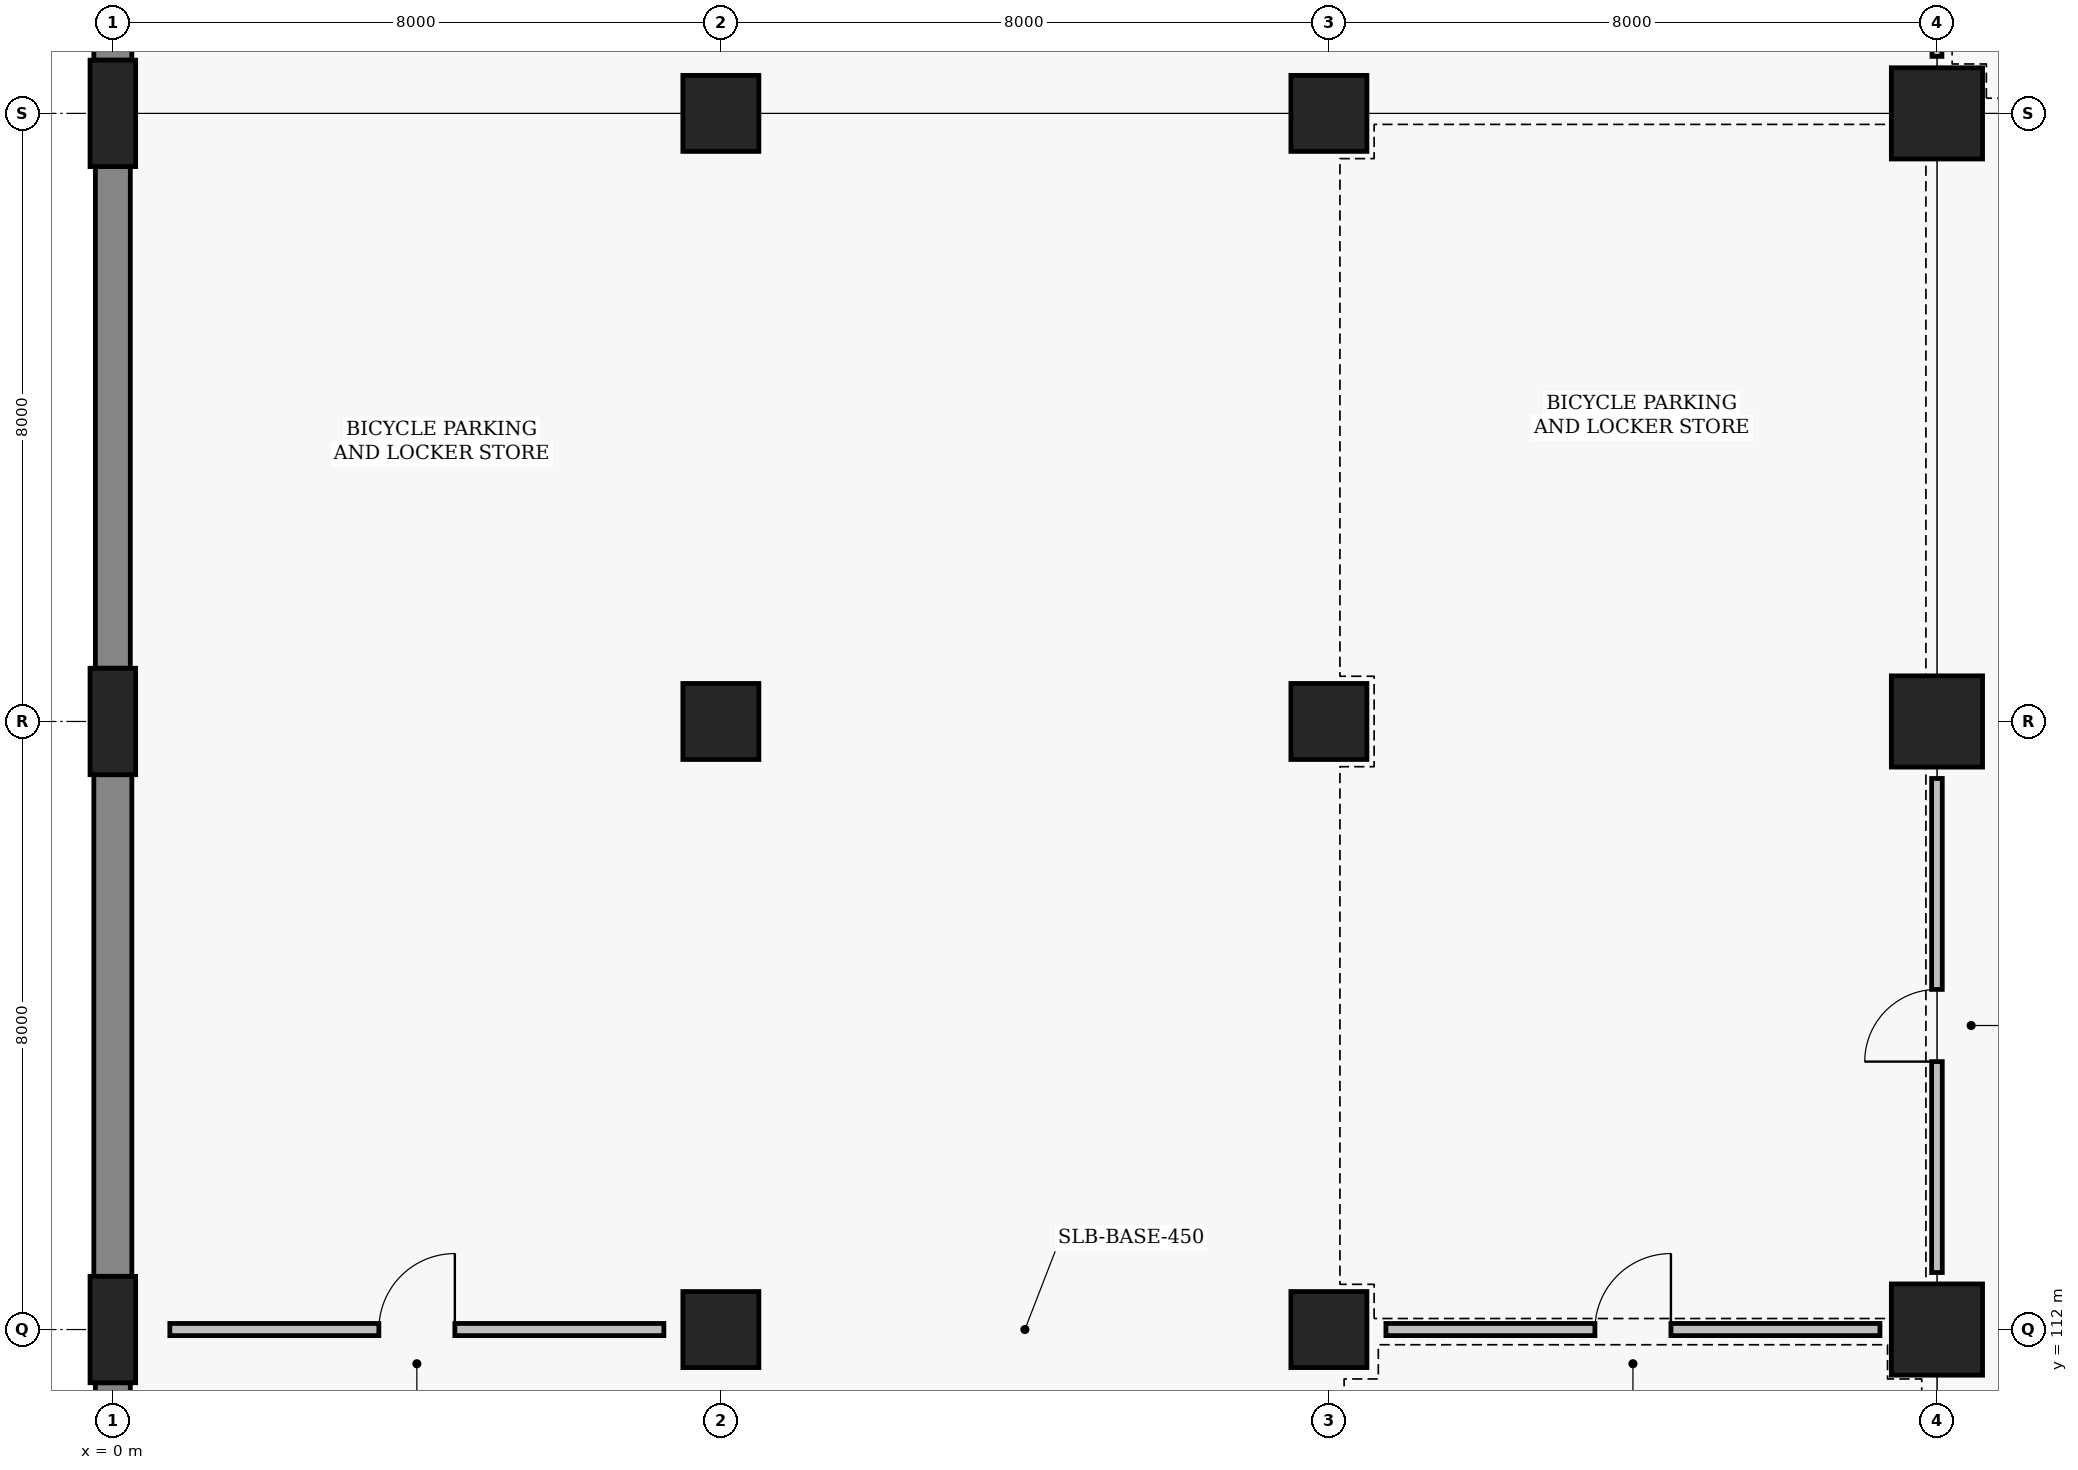
"""IFC4 building model, lengths in metres.
Left out: names, types, materials, properties, quantities, classifications, styles, units other than length and angle.
Written with IfcOpenShell. Run it as: python <this file> out.ifc"""

import sys

from ifc_helpers import new_model, si_unit, direction, frame, frame_2d, origin, origin_2d, place, context, subcontext, project, spatial, rectangle, circle, extrude, element, fill, save


model = new_model("IFC4")
c1 = context("Model", 3, precision=1e-05, world=origin(), true_north=direction((0.0, 1.0)))
c2 = subcontext(c1, "Body", "Model", "MODEL_VIEW")
j1 = project(units=[si_unit("LENGTHUNIT", "METRE"), si_unit("PLANEANGLEUNIT", "RADIAN")], contexts=[c1])
p1 = place(None, origin())
s1 = spatial("IfcSite", under=j1, at=p1, CompositionType="ELEMENT")
p2 = place(p1, origin())
s2 = spatial("IfcBuilding", under=s1, at=p2, CompositionType="ELEMENT")
p3 = place(p2, frame((0.0, 0.0, -5.4)))
s3 = spatial("IfcBuildingStorey", under=s2, at=p3, CompositionType="ELEMENT", Elevation=-5.4)
for number, where, z_axis, x_axis in (
    (1, (0.0, 112.0, 0.0), (0.0, 0.0, 1.0), (1.0, 0.0, 0.0)),
    (2, (0.0, 120.0, 0.0), (0.0, 0.0, 1.0), (1.0, 0.0, 0.0)),
    (3, (0.0, 128.0, 0.0), (0.0, 0.0, 1.0), (1.0, 0.0, 0.0)),
):
    element("IfcColumn", number, at=place(p3, frame(where, z_axis=z_axis, x_axis=x_axis)), inside=s3, PredefinedType="PILASTER", context=c2, shape_type="SweptSolid", body=[
        extrude(rectangle(XDim=0.6, YDim=1.4, at=origin_2d()), origin(), (0.0, 0.0, 1.0), 5.4),
    ])
for number, where, z_axis, x_axis in (
    (4, (8.0, 112.0, 0.0), (0.0, 0.0, 1.0), (1.0, 0.0, 0.0)),
    (5, (8.0, 120.0, 0.0), (0.0, 0.0, 1.0), (1.0, 0.0, 0.0)),
    (6, (8.0, 128.0, 0.0), (0.0, 0.0, 1.0), (1.0, 0.0, 0.0)),
    (7, (16.0, 112.0, 0.0), (0.0, 0.0, 1.0), (1.0, 0.0, 0.0)),
    (8, (16.0, 120.0, 0.0), (0.0, 0.0, 1.0), (1.0, 0.0, 0.0)),
    (9, (16.0, 128.0, 0.0), (0.0, 0.0, 1.0), (1.0, 0.0, 0.0)),
):
    element("IfcColumn", number, at=place(p3, frame(where, z_axis=z_axis, x_axis=x_axis)), inside=s3, PredefinedType="COLUMN", context=c2, shape_type="SweptSolid", body=[
        extrude(circle(Radius=0.5, at=origin_2d()), origin(), (0.0, 0.0, 1.0), 5.4),
    ])
for number, where, z_axis, x_axis in (
    (10, (24.0, 112.0, 0.0), (0.0, 0.0, 1.0), (1.0, 0.0, 0.0)),
    (11, (24.0, 120.0, 0.0), (0.0, 0.0, 1.0), (1.0, 0.0, 0.0)),
    (12, (24.0, 128.0, 0.0), (0.0, 0.0, 1.0), (1.0, 0.0, 0.0)),
):
    element("IfcColumn", number, at=place(p3, frame(where, z_axis=z_axis, x_axis=x_axis)), inside=s3, PredefinedType="COLUMN", context=c2, shape_type="SweptSolid", body=[
        extrude(rectangle(XDim=1.2, YDim=1.2, at=origin_2d()), origin(), (0.0, 0.0, 1.0), 5.4),
    ])
p4 = place(p3, frame((0.0, 104.7, 0.0), z_axis=(0.0, 0.0, 1.0), x_axis=(0.0, 1.0, 0.0)))
e13 = element("IfcWall", 13, at=p4, inside=s3, PredefinedType="STANDARD", context=c2, shape_type="SweptSolid", body=[
    extrude(rectangle(XDim=6.6, YDim=0.46, at=frame_2d((3.3, 0.0))), origin(), (0.0, 0.0, 1.0), 3.69),
])
p5 = place(p3, frame((0.0, 112.7, 0.0), z_axis=(0.0, 0.0, 1.0), x_axis=(0.0, 1.0, 0.0)))
e14 = element("IfcWall", 14, at=p5, inside=s3, PredefinedType="STANDARD", context=c2, shape_type="SweptSolid", body=[
    extrude(rectangle(XDim=6.6, YDim=0.5, at=frame_2d((3.3, 0.0))), origin(), (0.0, 0.0, 1.0), 3.69),
])
p6 = place(p3, frame((0.0, 120.7, 0.0), z_axis=(0.0, 0.0, 1.0), x_axis=(0.0, 1.0, 0.0)))
e15 = element("IfcWall", 15, at=p6, inside=s3, PredefinedType="STANDARD", context=c2, shape_type="SweptSolid", body=[
    extrude(rectangle(XDim=6.6, YDim=0.46, at=frame_2d((3.3, 0.0))), origin(), (0.0, 0.0, 1.0), 4.24),
])
p7 = place(p3, frame((0.0, 128.7, 0.0), z_axis=(0.0, 0.0, 1.0), x_axis=(0.0, 1.0, 0.0)))
e16 = element("IfcWall", 16, at=p7, inside=s3, PredefinedType="STANDARD", context=c2, shape_type="SweptSolid", body=[
    extrude(rectangle(XDim=6.6, YDim=0.5, at=frame_2d((3.3, 0.0))), origin(), (0.0, 0.0, 1.0), 4.24),
])
p8 = place(p3, frame((24.0, 112.75, 0.0), z_axis=(0.0, 0.0, 1.0), x_axis=(0.0, 1.0, 0.0)))
e17 = element("IfcWall", 17, at=p8, inside=s3, PredefinedType="MOVABLE", context=c2, shape_type="SweptSolid", body=[
    extrude(rectangle(XDim=6.5, YDim=0.14, at=frame_2d((3.25, 0.0))), origin(), (0.0, 0.0, 1.0), 4.39),
])
p9 = place(p8, frame((2.775, 0.0, 0.0)))
e18 = element("IfcOpeningElement", 18, at=p9, cuts=e17, PredefinedType="OPENING", context=c2, shape_type="SweptSolid", body=[
    extrude(rectangle(XDim=0.95, YDim=2.1, at=frame_2d((0.475, 1.05))), frame((0.0, 0.08, 0.0), z_axis=(0.0, -1.0, 0.0), x_axis=(1.0, 0.0, 0.0)), (0.0, 0.0, 1.0), 0.16),
])
p10 = place(p3, frame((24.0, 128.75, 0.0), z_axis=(0.0, 0.0, 1.0), x_axis=(0.0, 1.0, 0.0)))
e19 = element("IfcWall", 19, at=p10, inside=s3, PredefinedType="PARTITIONING", context=c2, shape_type="SweptSolid", body=[
    extrude(rectangle(XDim=6.5, YDim=0.13, at=frame_2d((3.25, 0.0))), origin(), (0.0, 0.0, 1.0), 4.39),
])
p11 = place(p10, frame((2.75, 0.0, 0.0)))
e20 = element("IfcOpeningElement", 20, at=p11, cuts=e19, PredefinedType="OPENING", context=c2, shape_type="SweptSolid", body=[
    extrude(rectangle(XDim=1.0, YDim=2.1, at=frame_2d((0.5, 1.05))), frame((0.0, 0.075, 0.0), z_axis=(0.0, -1.0, 0.0), x_axis=(1.0, 0.0, 0.0)), (0.0, 0.0, 1.0), 0.15),
])
p12 = place(p3, frame((0.75, 112.0, 0.0), z_axis=(0.0, 0.0, 1.0), x_axis=(1.0, 0.0, 0.0)))
e21 = element("IfcWall", 21, at=p12, inside=s3, PredefinedType="PARTITIONING", context=c2, shape_type="SweptSolid", body=[
    extrude(rectangle(XDim=6.5, YDim=0.16, at=frame_2d((3.25, 0.0))), origin(), (0.0, 0.0, 1.0), 3.69),
])
p13 = place(p12, frame((2.75, 0.0, 0.0)))
e22 = element("IfcOpeningElement", 22, at=p13, cuts=e21, PredefinedType="OPENING", context=c2, shape_type="SweptSolid", body=[
    extrude(rectangle(XDim=1.0, YDim=2.1, at=frame_2d((0.5, 1.05))), frame((0.0, 0.09, 0.0), z_axis=(0.0, -1.0, 0.0), x_axis=(1.0, 0.0, 0.0)), (0.0, 0.0, 1.0), 0.18),
])
p14 = place(p3, frame((16.75, 112.0, 0.0), z_axis=(0.0, 0.0, 1.0), x_axis=(1.0, 0.0, 0.0)))
e23 = element("IfcWall", 23, at=p14, inside=s3, PredefinedType="PARTITIONING", context=c2, shape_type="SweptSolid", body=[
    extrude(rectangle(XDim=6.5, YDim=0.16, at=frame_2d((3.25, 0.0))), origin(), (0.0, 0.0, 1.0), 4.49),
])
p15 = place(p14, frame((2.75, 0.0, 0.0)))
e24 = element("IfcOpeningElement", 24, at=p15, cuts=e23, PredefinedType="OPENING", context=c2, shape_type="SweptSolid", body=[
    extrude(rectangle(XDim=1.0, YDim=2.1, at=frame_2d((0.5, 1.05))), frame((0.0, 0.09, 0.0), z_axis=(0.0, -1.0, 0.0), x_axis=(1.0, 0.0, 0.0)), (0.0, 0.0, 1.0), 0.18),
])
p16 = place(p9, origin())
e25 = element("IfcDoor", 25, at=p16, inside=s3, OperationType="SINGLE_SWING_LEFT", PredefinedType="DOOR", context=c2, shape_type="SweptSolid", body=[
    extrude(rectangle(XDim=0.95, YDim=2.1, at=frame_2d((0.475, 1.05))), frame((0.0, 0.025, 0.0), z_axis=(0.0, -1.0, 0.0), x_axis=(1.0, 0.0, 0.0)), (0.0, 0.0, 1.0), 0.05),
])
fill(e18, e25)
p17 = place(p13, origin())
e26 = element("IfcDoor", 26, at=p17, inside=s3, OperationType="SINGLE_SWING_RIGHT", PredefinedType="DOOR", context=c2, shape_type="SweptSolid", body=[
    extrude(rectangle(XDim=1.0, YDim=2.1, at=frame_2d((0.5, 1.05))), frame((0.0, 0.025, 0.0), z_axis=(0.0, -1.0, 0.0), x_axis=(1.0, 0.0, 0.0)), (0.0, 0.0, 1.0), 0.05),
])
fill(e22, e26)
p18 = place(p15, origin())
e27 = element("IfcDoor", 27, at=p18, inside=s3, OperationType="SINGLE_SWING_RIGHT", PredefinedType="DOOR", context=c2, shape_type="SweptSolid", body=[
    extrude(rectangle(XDim=1.0, YDim=2.1, at=frame_2d((0.5, 1.05))), frame((0.0, 0.025, 0.0), z_axis=(0.0, -1.0, 0.0), x_axis=(1.0, 0.0, 0.0)), (0.0, 0.0, 1.0), 0.05),
])
fill(e24, e27)
save(model, sys.argv[1])
